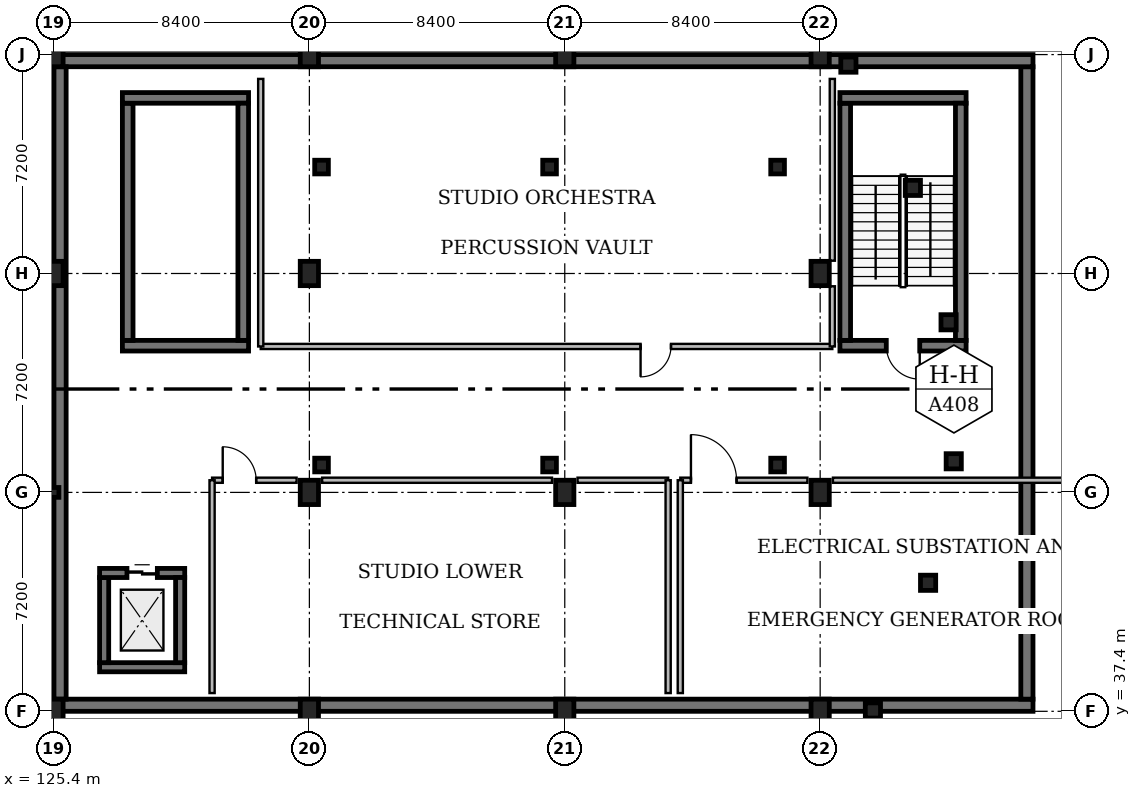
"""IFC4 building model, lengths in metres.
Left out: names, types, materials, properties, quantities, classifications, styles, units other than length and angle.
Written with IfcOpenShell. Run it as: python <this file> out.ifc"""

import sys

from ifc_helpers import new_model, si_unit, direction, frame, frame_2d, origin, origin_2d, place, context, subcontext, project, spatial, rectangle, hollow_circle, extrude, element, fill, save


model = new_model("IFC4")
c1 = context("Model", 3, precision=1e-05, world=origin(), true_north=direction((0.0, 1.0)))
c2 = subcontext(c1, "Body", "Model", "MODEL_VIEW")
j1 = project(units=[si_unit("LENGTHUNIT", "METRE"), si_unit("PLANEANGLEUNIT", "RADIAN")], contexts=[c1])
p1 = place(None, origin())
s1 = spatial("IfcSite", under=j1, at=p1, CompositionType="ELEMENT")
p2 = place(p1, origin())
s2 = spatial("IfcBuilding", under=s1, at=p2, CompositionType="ELEMENT")
p3 = place(p2, frame((0.0, 0.0, -4.8)))
s3 = spatial("IfcBuildingStorey", under=s2, at=p3, CompositionType="ELEMENT", Elevation=-4.8)
p4 = place(p3, frame((125.4, 37.4, 0.0), z_axis=(0.0, 0.0, 1.0), x_axis=(1.0, 0.0, 0.0)))
e1 = element("IfcColumn", 1, at=p4, inside=s3, PredefinedType="COLUMN", context=c2, shape_type="SweptSolid", body=[
    extrude(rectangle(XDim=0.6, YDim=0.8, at=origin_2d()), origin(), (0.0, 0.0, 1.0), 4.8),
])
p5 = place(p3, frame((125.4, 44.6, 0.0), z_axis=(0.0, 0.0, 1.0), x_axis=(1.0, 0.0, 0.0)))
e2 = element("IfcColumn", 2, at=p5, inside=s3, PredefinedType="COLUMN", context=c2, shape_type="SweptSolid", body=[
    extrude(hollow_circle(Radius=0.162, WallThickness=0.012, at=origin_2d()), origin(), (0.0, 0.0, 1.0), 4.8),
])
for number, where, z_axis, x_axis in (
    (3, (125.4, 51.8, 0.0), (0.0, 0.0, 1.0), (1.0, 0.0, 0.0)),
    (4, (125.4, 59.0, 0.0), (0.0, 0.0, 1.0), (1.0, 0.0, 0.0)),
    (5, (133.8, 37.4, 0.0), (0.0, 0.0, 1.0), (1.0, 0.0, 0.0)),
    (6, (133.8, 44.6, 0.0), (0.0, 0.0, 1.0), (1.0, 0.0, 0.0)),
    (7, (133.8, 51.8, 0.0), (0.0, 0.0, 1.0), (1.0, 0.0, 0.0)),
    (8, (133.8, 59.0, 0.0), (0.0, 0.0, 1.0), (1.0, 0.0, 0.0)),
    (9, (142.2, 37.4, 0.0), (0.0, 0.0, 1.0), (1.0, 0.0, 0.0)),
    (10, (142.2, 44.6, 0.0), (0.0, 0.0, 1.0), (1.0, 0.0, 0.0)),
    (11, (142.2, 59.0, 0.0), (0.0, 0.0, 1.0), (1.0, 0.0, 0.0)),
    (12, (150.6, 37.4, 0.0), (0.0, 0.0, 1.0), (1.0, 0.0, 0.0)),
    (13, (150.6, 44.6, 0.0), (0.0, 0.0, 1.0), (1.0, 0.0, 0.0)),
    (14, (150.6, 51.8, 0.0), (0.0, 0.0, 1.0), (1.0, 0.0, 0.0)),
    (15, (150.6, 59.0, 0.0), (0.0, 0.0, 1.0), (1.0, 0.0, 0.0)),
):
    element("IfcColumn", number, at=place(p3, frame(where, z_axis=z_axis, x_axis=x_axis)), inside=s3, PredefinedType="COLUMN", context=c2, shape_type="SweptSolid", body=[
        extrude(rectangle(XDim=0.6, YDim=0.8, at=origin_2d()), origin(), (0.0, 0.0, 1.0), 4.8),
    ])
for number, where, z_axis, x_axis in (
    (16, (134.2, 55.3, 0.0), (0.0, 0.0, 1.0), (1.0, 0.0, 0.0)),
    (17, (141.7, 55.3, 0.0), (0.0, 0.0, 1.0), (1.0, 0.0, 0.0)),
    (18, (149.2, 55.3, 0.0), (0.0, 0.0, 1.0), (1.0, 0.0, 0.0)),
    (19, (134.2, 45.5, 0.0), (0.0, 0.0, 1.0), (1.0, 0.0, 0.0)),
    (20, (141.7, 45.5, 0.0), (0.0, 0.0, 1.0), (1.0, 0.0, 0.0)),
    (21, (149.2, 45.5, 0.0), (0.0, 0.0, 1.0), (1.0, 0.0, 0.0)),
):
    element("IfcColumn", number, at=place(p3, frame(where, z_axis=z_axis, x_axis=x_axis)), inside=s3, PredefinedType="COLUMN", context=c2, shape_type="SweptSolid", body=[
        extrude(rectangle(XDim=0.45, YDim=0.45, at=origin_2d()), origin(), (0.0, 0.0, 1.0), 4.8),
    ])
for number, where, z_axis, x_axis in (
    (22, (151.528, 58.669, 0.0), (0.0, 0.0, 1.0), (1.0, 0.0, 0.0)),
    (23, (153.649, 54.616, 0.0), (0.0, 0.0, 1.0), (1.0, 0.0, 0.0)),
    (24, (154.824, 50.195, 0.0), (0.0, 0.0, 1.0), (1.0, 0.0, 0.0)),
    (25, (154.993, 45.623, 0.0), (0.0, 0.0, 1.0), (1.0, 0.0, 0.0)),
    (26, (154.15, 41.627, 0.0), (0.0, 0.0, 1.0), (1.0, 0.0, 0.0)),
    (27, (152.335, 37.428, 0.0), (0.0, 0.0, 1.0), (1.0, 0.0, 0.0)),
):
    element("IfcColumn", number, at=place(p3, frame(where, z_axis=z_axis, x_axis=x_axis)), inside=s3, PredefinedType="COLUMN", context=c2, shape_type="SweptSolid", body=[
        extrude(rectangle(XDim=0.5, YDim=0.5, at=origin_2d()), origin(), (0.0, 0.0, 1.0), 4.8),
    ])
p6 = place(p3, frame((131.8, 49.425, 0.0), z_axis=(0.0, 0.0, 1.0), x_axis=(-1.0, 0.0, 0.0)))
e28 = element("IfcWall", 28, at=p6, inside=s3, PredefinedType="SOLIDWALL", context=c2, shape_type="SweptSolid", body=[
    extrude(rectangle(XDim=4.15, YDim=0.35, at=frame_2d((2.075, 0.0))), origin(), (0.0, 0.0, 1.0), 4.52),
])
p7 = place(p3, frame((127.825, 49.6, 0.0), z_axis=(0.0, 0.0, 1.0), x_axis=(0.0, 1.0, 0.0)))
e29 = element("IfcWall", 29, at=p7, inside=s3, PredefinedType="SOLIDWALL", context=c2, shape_type="SweptSolid", body=[
    extrude(rectangle(XDim=7.8, YDim=0.35, at=frame_2d((3.9, 0.0))), origin(), (0.0, 0.0, 1.0), 4.52),
])
p8 = place(p3, frame((127.65, 57.575, 0.0), z_axis=(0.0, 0.0, 1.0), x_axis=(1.0, 0.0, 0.0)))
e30 = element("IfcWall", 30, at=p8, inside=s3, PredefinedType="SOLIDWALL", context=c2, shape_type="SweptSolid", body=[
    extrude(rectangle(XDim=4.15, YDim=0.35, at=frame_2d((2.075, 0.0))), origin(), (0.0, 0.0, 1.0), 4.52),
])
p9 = place(p3, frame((131.625, 57.4, 0.0), z_axis=(0.0, 0.0, 1.0), x_axis=(0.0, -1.0, 0.0)))
e31 = element("IfcWall", 31, at=p9, inside=s3, PredefinedType="SOLIDWALL", context=c2, shape_type="SweptSolid", body=[
    extrude(rectangle(XDim=7.8, YDim=0.35, at=frame_2d((3.9, 0.0))), origin(), (0.0, 0.0, 1.0), 4.52),
])
p10 = place(p3, frame((155.4, 49.425, 0.0), z_axis=(0.0, 0.0, 1.0), x_axis=(-1.0, 0.0, 0.0)))
e32 = element("IfcWall", 32, at=p10, inside=s3, PredefinedType="SOLIDWALL", context=c2, shape_type="SweptSolid", body=[
    extrude(rectangle(XDim=4.15, YDim=0.35, at=frame_2d((2.075, 0.0))), origin(), (0.0, 0.0, 1.0), 4.56),
])
p11 = place(p10, frame((1.525, 0.0, 0.0)))
e33 = element("IfcOpeningElement", 33, at=p11, cuts=e32, PredefinedType="OPENING", context=c2, shape_type="SweptSolid", body=[
    extrude(rectangle(XDim=1.1, YDim=2.15, at=frame_2d((0.55, 1.075))), frame((0.0, 0.195, 0.0), z_axis=(0.0, -1.0, 0.0), x_axis=(1.0, 0.0, 0.0)), (0.0, 0.0, 1.0), 0.39),
])
p12 = place(p3, frame((151.425, 49.6, 0.0), z_axis=(0.0, 0.0, 1.0), x_axis=(0.0, 1.0, 0.0)))
e34 = element("IfcWall", 34, at=p12, inside=s3, PredefinedType="SOLIDWALL", context=c2, shape_type="SweptSolid", body=[
    extrude(rectangle(XDim=7.8, YDim=0.35, at=frame_2d((3.9, 0.0))), origin(), (0.0, 0.0, 1.0), 4.56),
])
p13 = place(p3, frame((151.25, 57.575, 0.0), z_axis=(0.0, 0.0, 1.0), x_axis=(1.0, 0.0, 0.0)))
e35 = element("IfcWall", 35, at=p13, inside=s3, PredefinedType="SOLIDWALL", context=c2, shape_type="SweptSolid", body=[
    extrude(rectangle(XDim=4.15, YDim=0.35, at=frame_2d((2.075, 0.0))), origin(), (0.0, 0.0, 1.0), 4.56),
])
p14 = place(p3, frame((155.225, 57.4, 0.0), z_axis=(0.0, 0.0, 1.0), x_axis=(0.0, -1.0, 0.0)))
e36 = element("IfcWall", 36, at=p14, inside=s3, PredefinedType="SOLIDWALL", context=c2, shape_type="SweptSolid", body=[
    extrude(rectangle(XDim=7.8, YDim=0.35, at=frame_2d((3.9, 0.0))), origin(), (0.0, 0.0, 1.0), 4.56),
])
for number, where, z_axis, x_axis in (
    (37, (129.7, 38.85, 0.0), (0.0, 0.0, 1.0), (-1.0, 0.0, 0.0)),
    (38, (127.05, 39.0, 0.0), (0.0, 0.0, 1.0), (0.0, 1.0, 0.0)),
):
    element("IfcWall", number, at=place(p3, frame(where, z_axis=z_axis, x_axis=x_axis)), inside=s3, PredefinedType="SOLIDWALL", context=c2, shape_type="SweptSolid", body=[
        extrude(rectangle(XDim=2.8, YDim=0.3, at=frame_2d((1.4, 0.0))), origin(), (0.0, 0.0, 1.0), 4.8),
    ])
p15 = place(p3, frame((126.9, 41.95, 0.0), z_axis=(0.0, 0.0, 1.0), x_axis=(1.0, 0.0, 0.0)))
e39 = element("IfcWall", 39, at=p15, inside=s3, PredefinedType="SOLIDWALL", context=c2, shape_type="SweptSolid", body=[
    extrude(rectangle(XDim=2.8, YDim=0.3, at=frame_2d((1.4, 0.0))), origin(), (0.0, 0.0, 1.0), 4.8),
])
p16 = place(p15, frame((0.9, 0.0, 0.0)))
e40 = element("IfcOpeningElement", 40, at=p16, cuts=e39, PredefinedType="OPENING", context=c2, shape_type="SweptSolid", body=[
    extrude(rectangle(XDim=1.0, YDim=2.15, at=frame_2d((0.5, 1.075))), frame((0.0, 0.17, 0.0), z_axis=(0.0, -1.0, 0.0), x_axis=(1.0, 0.0, 0.0)), (0.0, 0.0, 1.0), 0.34),
])
p17 = place(p3, frame((129.55, 41.8, 0.0), z_axis=(0.0, 0.0, 1.0), x_axis=(0.0, -1.0, 0.0)))
e41 = element("IfcWall", 41, at=p17, inside=s3, PredefinedType="SOLIDWALL", context=c2, shape_type="SweptSolid", body=[
    extrude(rectangle(XDim=2.8, YDim=0.3, at=frame_2d((1.4, 0.0))), origin(), (0.0, 0.0, 1.0), 4.8),
])
p18 = place(p3, frame((125.4, 37.6, 0.0), z_axis=(0.0, 0.0, 1.0), x_axis=(1.0, 0.0, 0.0)))
e42 = element("IfcWall", 42, at=p18, inside=s3, PredefinedType="SOLIDWALL", context=c2, shape_type="SweptSolid", body=[
    extrude(rectangle(XDim=32.2, YDim=0.4, at=frame_2d((16.1, 0.0))), origin(), (0.0, 0.0, 1.0), 4.48),
])
p19 = place(p3, frame((157.4, 37.8, 0.0), z_axis=(0.0, 0.0, 1.0), x_axis=(0.0, 1.0, 0.0)))
e43 = element("IfcWall", 43, at=p19, inside=s3, PredefinedType="SOLIDWALL", context=c2, shape_type="SweptSolid", body=[
    extrude(rectangle(XDim=20.8, YDim=0.4, at=frame_2d((10.4, 0.0))), origin(), (0.0, 0.0, 1.0), 4.48),
])
p20 = place(p3, frame((125.4, 58.8, 0.0), z_axis=(0.0, 0.0, 1.0), x_axis=(1.0, 0.0, 0.0)))
e44 = element("IfcWall", 44, at=p20, inside=s3, PredefinedType="SOLIDWALL", context=c2, shape_type="SweptSolid", body=[
    extrude(rectangle(XDim=32.2, YDim=0.4, at=frame_2d((16.1, 0.0))), origin(), (0.0, 0.0, 1.0), 4.48),
])
p21 = place(p3, frame((125.6, 37.8, 0.0), z_axis=(0.0, 0.0, 1.0), x_axis=(0.0, 1.0, 0.0)))
e45 = element("IfcWall", 45, at=p21, inside=s3, PredefinedType="SOLIDWALL", context=c2, shape_type="SweptSolid", body=[
    extrude(rectangle(XDim=20.8, YDim=0.4, at=frame_2d((10.4, 0.0))), origin(), (0.0, 0.0, 1.0), 4.48),
])
p22 = place(p3, frame((130.6, 45.0, 0.0), z_axis=(0.0, 0.0, 1.0), x_axis=(1.0, 0.0, 0.0)))
e46 = element("IfcWall", 46, at=p22, inside=s3, PredefinedType="PARTITIONING", context=c2, shape_type="SweptSolid", body=[
    extrude(rectangle(XDim=2.78, YDim=0.17, at=frame_2d((1.39, 0.0))), origin(), (0.0, 0.0, 1.0), 4.52),
])
p23 = place(p22, frame((0.35, 0.0, 0.0)))
e47 = element("IfcOpeningElement", 47, at=p23, cuts=e46, PredefinedType="OPENING", context=c2, shape_type="SweptSolid", body=[
    extrude(rectangle(XDim=1.1, YDim=2.1, at=frame_2d((0.55, 1.05))), frame((0.0, 0.105, 0.0), z_axis=(0.0, -1.0, 0.0), x_axis=(1.0, 0.0, 0.0)), (0.0, 0.0, 1.0), 0.21),
])
p24 = place(p3, frame((134.22, 45.0, 0.0), z_axis=(0.0, 0.0, 1.0), x_axis=(1.0, 0.0, 0.0)))
e48 = element("IfcWall", 48, at=p24, inside=s3, PredefinedType="PARTITIONING", context=c2, shape_type="SweptSolid", body=[
    extrude(rectangle(XDim=7.56, YDim=0.17, at=frame_2d((3.78, 0.0))), origin(), (0.0, 0.0, 1.0), 3.79),
])
p25 = place(p3, frame((142.62, 45.0, 0.0), z_axis=(0.0, 0.0, 1.0), x_axis=(1.0, 0.0, 0.0)))
e49 = element("IfcWall", 49, at=p25, inside=s3, PredefinedType="PARTITIONING", context=c2, shape_type="SweptSolid", body=[
    extrude(rectangle(XDim=2.98, YDim=0.17, at=frame_2d((1.49, 0.0))), origin(), (0.0, 0.0, 1.0), 3.79),
])
for number, where, z_axis, x_axis in (
    (50, (130.6, 38.0, 0.0), (0.0, 0.0, 1.0), (0.0, 1.0, 0.0)),
    (51, (145.6, 45.0, 0.0), (0.0, 0.0, 1.0), (0.0, -1.0, 0.0)),
):
    element("IfcWall", number, at=place(p3, frame(where, z_axis=z_axis, x_axis=x_axis)), inside=s3, PredefinedType="PARTITIONING", context=c2, shape_type="SweptSolid", body=[
        extrude(rectangle(XDim=7.0, YDim=0.17, at=frame_2d((3.5, 0.0))), origin(), (0.0, 0.0, 1.0), 4.52),
    ])
p26 = place(p3, frame((146.0, 45.0, 0.0), z_axis=(0.0, 0.0, 1.0), x_axis=(1.0, 0.0, 0.0)))
e52 = element("IfcWall", 52, at=p26, inside=s3, PredefinedType="PARTITIONING", context=c2, shape_type="SweptSolid", body=[
    extrude(rectangle(XDim=4.18, YDim=0.17, at=frame_2d((2.09, 0.0))), origin(), (0.0, 0.0, 1.0), 3.79),
])
p27 = place(p26, frame((0.35, 0.0, 0.0)))
e53 = element("IfcOpeningElement", 53, at=p27, cuts=e52, PredefinedType="OPENING", context=c2, shape_type="SweptSolid", body=[
    extrude(rectangle(XDim=1.5, YDim=2.2, at=frame_2d((0.75, 1.1))), frame((0.0, 0.105, 0.0), z_axis=(0.0, -1.0, 0.0), x_axis=(1.0, 0.0, 0.0)), (0.0, 0.0, 1.0), 0.21),
])
p28 = place(p3, frame((151.02, 45.0, 0.0), z_axis=(0.0, 0.0, 1.0), x_axis=(1.0, 0.0, 0.0)))
e54 = element("IfcWall", 54, at=p28, inside=s3, PredefinedType="PARTITIONING", context=c2, shape_type="SweptSolid", body=[
    extrude(rectangle(XDim=7.56, YDim=0.17, at=frame_2d((3.78, 0.0))), origin(), (0.0, 0.0, 1.0), 3.79),
])
p29 = place(p3, frame((146.0, 38.0, 0.0), z_axis=(0.0, 0.0, 1.0), x_axis=(0.0, 1.0, 0.0)))
e55 = element("IfcWall", 55, at=p29, inside=s3, PredefinedType="PARTITIONING", context=c2, shape_type="SweptSolid", body=[
    extrude(rectangle(XDim=7.0, YDim=0.17, at=frame_2d((3.5, 0.0))), origin(), (0.0, 0.0, 1.0), 4.52),
])
p30 = place(p3, frame((151.0, 49.4, 0.0), z_axis=(0.0, 0.0, 1.0), x_axis=(-1.0, 0.0, 0.0)))
e56 = element("IfcWall", 56, at=p30, inside=s3, PredefinedType="PARTITIONING", context=c2, shape_type="SweptSolid", body=[
    extrude(rectangle(XDim=18.8, YDim=0.17, at=frame_2d((9.4, 0.0))), origin(), (0.0, 0.0, 1.0), 4.52),
])
p31 = place(p30, frame((5.306, 0.0, 0.0)))
e57 = element("IfcOpeningElement", 57, at=p31, cuts=e56, PredefinedType="OPENING", context=c2, shape_type="SweptSolid", body=[
    extrude(rectangle(XDim=1.0, YDim=2.2, at=frame_2d((0.5, 1.1))), frame((0.0, 0.105, 0.0), z_axis=(0.0, -1.0, 0.0), x_axis=(1.0, 0.0, 0.0)), (0.0, 0.0, 1.0), 0.21),
])
p32 = place(p3, frame((132.2, 49.4, 0.0), z_axis=(0.0, 0.0, 1.0), x_axis=(0.0, 1.0, 0.0)))
e58 = element("IfcWall", 58, at=p32, inside=s3, PredefinedType="PARTITIONING", context=c2, shape_type="SweptSolid", body=[
    extrude(rectangle(XDim=8.8, YDim=0.17, at=frame_2d((4.4, 0.0))), origin(), (0.0, 0.0, 1.0), 4.52),
])
p33 = place(p3, frame((151.0, 58.2, 0.0), z_axis=(0.0, 0.0, 1.0), x_axis=(0.0, -1.0, 0.0)))
e59 = element("IfcWall", 59, at=p33, inside=s3, PredefinedType="PARTITIONING", context=c2, shape_type="SweptSolid", body=[
    extrude(rectangle(XDim=5.98, YDim=0.17, at=frame_2d((2.99, 0.0))), origin(), (0.0, 0.0, 1.0), 3.84),
])
p34 = place(p3, frame((151.0, 51.38, 0.0), z_axis=(0.0, 0.0, 1.0), x_axis=(0.0, -1.0, 0.0)))
e60 = element("IfcWall", 60, at=p34, inside=s3, PredefinedType="PARTITIONING", context=c2, shape_type="SweptSolid", body=[
    extrude(rectangle(XDim=1.98, YDim=0.17, at=frame_2d((0.99, 0.0))), origin(), (0.0, 0.0, 1.0), 3.84),
])
p35 = place(p11, origin())
e61 = element("IfcDoor", 61, at=p35, inside=s3, OperationType="SINGLE_SWING_LEFT", PredefinedType="DOOR", context=c2, shape_type="SweptSolid", body=[
    extrude(rectangle(XDim=1.1, YDim=2.15, at=frame_2d((0.55, 1.075))), frame((0.0, 0.025, 0.0), z_axis=(0.0, -1.0, 0.0), x_axis=(1.0, 0.0, 0.0)), (0.0, 0.0, 1.0), 0.05),
])
fill(e33, e61)
p36 = place(p16, origin())
e62 = element("IfcDoor", 62, at=p36, inside=s3, OperationType="DOUBLE_DOOR_SLIDING", PredefinedType="DOOR", context=c2, shape_type="SweptSolid", body=[
    extrude(rectangle(XDim=1.0, YDim=2.15, at=frame_2d((0.5, 1.075))), frame((0.0, 0.025, 0.0), z_axis=(0.0, -1.0, 0.0), x_axis=(1.0, 0.0, 0.0)), (0.0, 0.0, 1.0), 0.05),
])
fill(e40, e62)
p37 = place(p23, origin())
e63 = element("IfcDoor", 63, at=p37, inside=s3, OperationType="SINGLE_SWING_LEFT", PredefinedType="DOOR", context=c2, shape_type="SweptSolid", body=[
    extrude(rectangle(XDim=1.1, YDim=2.1, at=frame_2d((0.55, 1.05))), frame((0.0, 0.025, 0.0), z_axis=(0.0, -1.0, 0.0), x_axis=(1.0, 0.0, 0.0)), (0.0, 0.0, 1.0), 0.05),
])
fill(e47, e63)
p38 = place(p27, origin())
e64 = element("IfcDoor", 64, at=p38, inside=s3, OperationType="DOUBLE_DOOR_SINGLE_SWING", PredefinedType="DOOR", context=c2, shape_type="SweptSolid", body=[
    extrude(rectangle(XDim=1.5, YDim=2.2, at=frame_2d((0.75, 1.1))), frame((0.0, 0.025, 0.0), z_axis=(0.0, -1.0, 0.0), x_axis=(1.0, 0.0, 0.0)), (0.0, 0.0, 1.0), 0.05),
])
fill(e53, e64)
p39 = place(p31, origin())
e65 = element("IfcDoor", 65, at=p39, inside=s3, OperationType="SINGLE_SWING_RIGHT", PredefinedType="DOOR", context=c2, shape_type="SweptSolid", body=[
    extrude(rectangle(XDim=1.0, YDim=2.2, at=frame_2d((0.5, 1.1))), frame((0.0, 0.025, 0.0), z_axis=(0.0, -1.0, 0.0), x_axis=(1.0, 0.0, 0.0)), (0.0, 0.0, 1.0), 0.05),
])
fill(e57, e65)
save(model, sys.argv[1])
